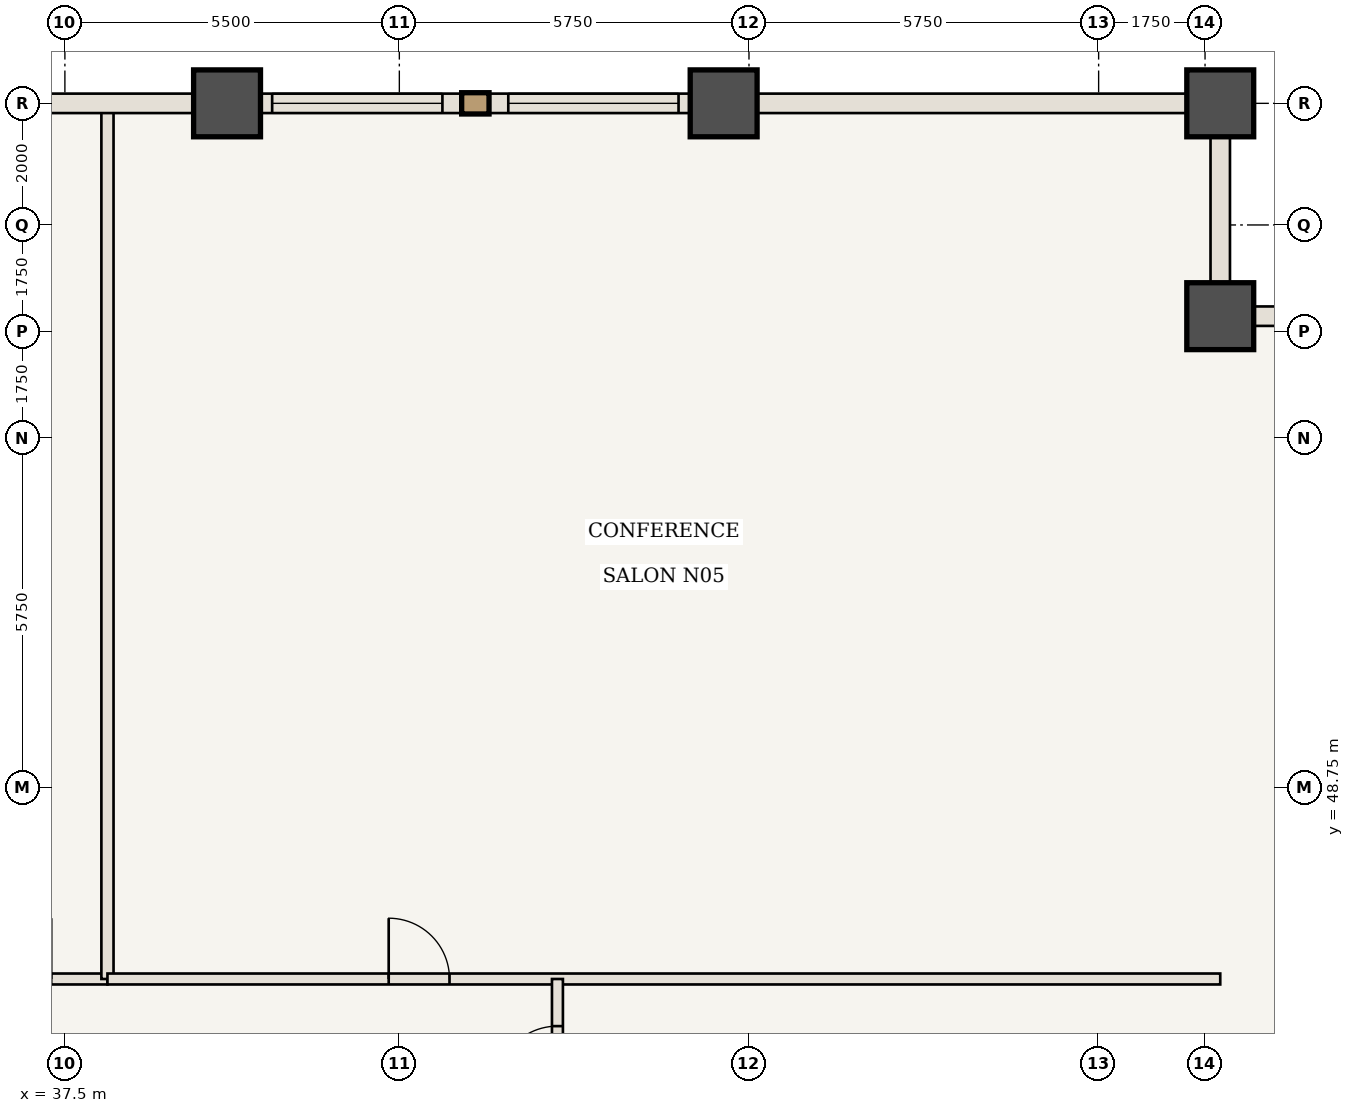
"""IFC4 building model, lengths in metres.
Left out: names, types, materials, properties, quantities, classifications, styles, units other than length and angle.
Written with IfcOpenShell. Run it as: python <this file> out.ifc"""

import sys

from ifc_helpers import new_model, si_unit, direction, frame, frame_2d, origin, origin_2d, place, context, subcontext, project, spatial, rectangle, extrude, element, fill, save


model = new_model("IFC4")
c1 = context("Model", 3, precision=1e-05, world=origin(), true_north=direction((0.0, 1.0)))
c2 = subcontext(c1, "Body", "Model", "MODEL_VIEW")
j1 = project(units=[si_unit("LENGTHUNIT", "METRE"), si_unit("PLANEANGLEUNIT", "RADIAN")], contexts=[c1])
p1 = place(None, origin())
s1 = spatial("IfcSite", under=j1, at=p1, CompositionType="ELEMENT")
p2 = place(p1, origin())
s2 = spatial("IfcBuilding", under=s1, at=p2, CompositionType="ELEMENT")
p3 = place(p2, frame((0.0, 0.0, 38.85)))
s3 = spatial("IfcBuildingStorey", under=s2, at=p3, CompositionType="ELEMENT", Elevation=38.85)
for number, where, z_axis, x_axis in (
    (1, (56.5, 56.5, 0.0), (0.0, 0.0, 1.0), (1.0, 0.0, 0.0)),
    (2, (56.5, 60.0, 0.0), (0.0, 0.0, 1.0), (1.0, 0.0, 0.0)),
    (3, (40.167, 60.0, 0.0), (0.0, 0.0, 1.0), (1.0, 0.0, 0.0)),
    (4, (48.333, 60.0, 0.0), (0.0, 0.0, 1.0), (1.0, 0.0, 0.0)),
):
    element("IfcColumn", number, at=place(p3, frame(where, z_axis=z_axis, x_axis=x_axis)), inside=s3, PredefinedType="COLUMN", context=c2, shape_type="SweptSolid", body=[
        extrude(rectangle(XDim=1.1, YDim=1.1, at=origin_2d()), origin(), (0.0, 0.0, 1.0), 3.5),
    ])
p4 = place(p3, frame((33.5, 45.6, 0.0), z_axis=(0.0, 0.0, 1.0), x_axis=(1.0, 0.0, 0.0)))
e5 = element("IfcWall", 5, at=p4, inside=s3, PredefinedType="STANDARD", context=c2, shape_type="SweptSolid", body=[
    extrude(rectangle(XDim=4.7, YDim=0.18, at=frame_2d((2.35, 0.0))), origin(), (0.0, 0.0, 1.0), 3.08),
])
p5 = place(p4, frame((2.775, 0.0, 0.0)))
e6 = element("IfcOpeningElement", 6, at=p5, cuts=e5, PredefinedType="OPENING", context=c2, shape_type="SweptSolid", body=[
    extrude(rectangle(XDim=1.0, YDim=2.15, at=frame_2d((0.5, 1.075))), frame((0.0, 0.1, 0.0), z_axis=(0.0, -1.0, 0.0), x_axis=(1.0, 0.0, 0.0)), (0.0, 0.0, 1.0), 0.2),
])
p6 = place(p3, frame((38.2, 45.6, 0.0), z_axis=(0.0, 0.0, 1.0), x_axis=(0.0, 1.0, 0.0)))
e7 = element("IfcWall", 7, at=p6, inside=s3, PredefinedType="STANDARD", context=c2, shape_type="SweptSolid", body=[
    extrude(rectangle(XDim=14.34, YDim=0.2, at=frame_2d((7.17, 0.0))), origin(), (0.0, 0.0, 1.0), 3.08),
])
p7 = place(p3, frame((38.2, 45.6, 0.0), z_axis=(0.0, 0.0, 1.0), x_axis=(1.0, 0.0, 0.0)))
e8 = element("IfcWall", 8, at=p7, inside=s3, PredefinedType="STANDARD", context=c2, shape_type="SweptSolid", body=[
    extrude(rectangle(XDim=18.3, YDim=0.18, at=frame_2d((9.15, 0.0))), origin(), (0.0, 0.0, 1.0), 3.08),
])
p8 = place(p7, frame((4.625, 0.0, 0.0)))
e9 = element("IfcOpeningElement", 9, at=p8, cuts=e8, PredefinedType="OPENING", context=c2, shape_type="SweptSolid", body=[
    extrude(rectangle(XDim=1.0, YDim=2.15, at=frame_2d((0.5, 1.075))), frame((0.0, 0.1, 0.0), z_axis=(0.0, -1.0, 0.0), x_axis=(1.0, 0.0, 0.0)), (0.0, 0.0, 1.0), 0.2),
])
p9 = place(p3, frame((45.6, 41.2, 0.0), z_axis=(0.0, 0.0, 1.0), x_axis=(0.0, 1.0, 0.0)))
e10 = element("IfcWall", 10, at=p9, inside=s3, PredefinedType="STANDARD", context=c2, shape_type="SweptSolid", body=[
    extrude(rectangle(XDim=4.4, YDim=0.18, at=frame_2d((2.2, 0.0))), origin(), (0.0, 0.0, 1.0), 3.08),
])
p10 = place(p9, frame((2.625, 0.0, 0.0)))
e11 = element("IfcOpeningElement", 11, at=p10, cuts=e10, PredefinedType="OPENING", context=c2, shape_type="SweptSolid", body=[
    extrude(rectangle(XDim=1.0, YDim=2.15, at=frame_2d((0.5, 1.075))), frame((0.0, 0.1, 0.0), z_axis=(0.0, -1.0, 0.0), x_axis=(1.0, 0.0, 0.0)), (0.0, 0.0, 1.0), 0.2),
])
p11 = place(p3, frame((32.0, 60.0, 0.0), z_axis=(0.0, 0.0, 1.0), x_axis=(1.0, 0.0, 0.0)))
e12 = element("IfcWall", 12, at=p11, inside=s3, PredefinedType="USERDEFINED", context=c2, shape_type="SweptSolid", body=[
    extrude(rectangle(XDim=8.167, YDim=0.32, at=frame_2d((4.083, 0.0))), origin(), (0.0, 0.0, 1.0), 2.28),
])
p12 = place(p11, frame((2.65, 0.0, 0.85)))
e13 = element("IfcOpeningElement", 13, at=p12, cuts=e12, PredefinedType="OPENING", context=c2, shape_type="SweptSolid", body=[
    extrude(rectangle(XDim=2.4, YDim=1.23, at=frame_2d((1.2, 0.615))), frame((0.0, 0.17, 0.0), z_axis=(0.0, -1.0, 0.0), x_axis=(1.0, 0.0, 0.0)), (0.0, 0.0, 1.0), 0.34),
])
p13 = place(p3, frame((40.167, 60.0, 0.0), z_axis=(0.0, 0.0, 1.0), x_axis=(1.0, 0.0, 0.0)))
e14 = element("IfcWall", 14, at=p13, inside=s3, PredefinedType="USERDEFINED", context=c2, shape_type="SweptSolid", body=[
    extrude(rectangle(XDim=8.167, YDim=0.32, at=frame_2d((4.083, 0.0))), origin(), (0.0, 0.0, 1.0), 2.28),
])
p14 = place(p13, frame((0.742, 0.0, 0.85)))
e15 = element("IfcOpeningElement", 15, at=p14, cuts=e14, PredefinedType="OPENING", context=c2, shape_type="SweptSolid", body=[
    extrude(rectangle(XDim=2.8, YDim=1.23, at=frame_2d((1.4, 0.615))), frame((0.0, 0.17, 0.0), z_axis=(0.0, -1.0, 0.0), x_axis=(1.0, 0.0, 0.0)), (0.0, 0.0, 1.0), 0.34),
])
p15 = place(p13, frame((4.625, 0.0, 0.85)))
e16 = element("IfcOpeningElement", 16, at=p15, cuts=e14, PredefinedType="OPENING", context=c2, shape_type="SweptSolid", body=[
    extrude(rectangle(XDim=2.8, YDim=1.23, at=frame_2d((1.4, 0.615))), frame((0.0, 0.17, 0.0), z_axis=(0.0, -1.0, 0.0), x_axis=(1.0, 0.0, 0.0)), (0.0, 0.0, 1.0), 0.34),
])
p16 = place(p3, frame((48.333, 60.0, 0.0), z_axis=(0.0, 0.0, 1.0), x_axis=(1.0, 0.0, 0.0)))
e17 = element("IfcWall", 17, at=p16, inside=s3, PredefinedType="USERDEFINED", context=c2, shape_type="SweptSolid", body=[
    extrude(rectangle(XDim=8.167, YDim=0.32, at=frame_2d((4.083, 0.0))), origin(), (0.0, 0.0, 1.0), 2.28),
])
for number, where, z_axis, x_axis in (
    (18, (56.5, 56.5, 0.0), (0.0, 0.0, 1.0), (1.0, 0.0, 0.0)),
    (19, (56.5, 60.0, 0.0), (0.0, 0.0, 1.0), (0.0, -1.0, 0.0)),
):
    element("IfcWall", number, at=place(p3, frame(where, z_axis=z_axis, x_axis=x_axis)), inside=s3, PredefinedType="USERDEFINED", context=c2, shape_type="SweptSolid", body=[
        extrude(rectangle(XDim=3.5, YDim=0.32, at=frame_2d((1.75, 0.0))), origin(), (0.0, 0.0, 1.0), 2.28),
    ])
p17 = place(p8, origin())
e20 = element("IfcDoor", 20, at=p17, inside=s3, OperationType="SINGLE_SWING_LEFT", PredefinedType="DOOR", context=c2, shape_type="SweptSolid", body=[
    extrude(rectangle(XDim=1.0, YDim=2.15, at=frame_2d((0.5, 1.075))), frame((0.0, 0.025, 0.0), z_axis=(0.0, -1.0, 0.0), x_axis=(1.0, 0.0, 0.0)), (0.0, 0.0, 1.0), 0.05),
])
fill(e9, e20)
p18 = place(p10, origin())
e21 = element("IfcDoor", 21, at=p18, inside=s3, OperationType="SINGLE_SWING_LEFT", PredefinedType="DOOR", context=c2, shape_type="SweptSolid", body=[
    extrude(rectangle(XDim=1.0, YDim=2.15, at=frame_2d((0.5, 1.075))), frame((0.0, 0.025, 0.0), z_axis=(0.0, -1.0, 0.0), x_axis=(1.0, 0.0, 0.0)), (0.0, 0.0, 1.0), 0.05),
])
fill(e11, e21)
p19 = place(p14, origin())
e22 = element("IfcWindow", 22, at=p19, inside=s3, PartitioningType="SINGLE_PANEL", PredefinedType="WINDOW", context=c2, shape_type="SweptSolid", body=[
    extrude(rectangle(XDim=2.8, YDim=1.23, at=frame_2d((1.4, 0.615))), frame((0.0, 0.03, 0.0), z_axis=(0.0, -1.0, 0.0), x_axis=(1.0, 0.0, 0.0)), (0.0, 0.0, 1.0), 0.06),
])
fill(e15, e22)
p20 = place(p15, origin())
e23 = element("IfcWindow", 23, at=p20, inside=s3, PartitioningType="SINGLE_PANEL", PredefinedType="WINDOW", context=c2, shape_type="SweptSolid", body=[
    extrude(rectangle(XDim=2.8, YDim=1.23, at=frame_2d((1.4, 0.615))), frame((0.0, 0.03, 0.0), z_axis=(0.0, -1.0, 0.0), x_axis=(1.0, 0.0, 0.0)), (0.0, 0.0, 1.0), 0.06),
])
fill(e16, e23)
save(model, sys.argv[1])
